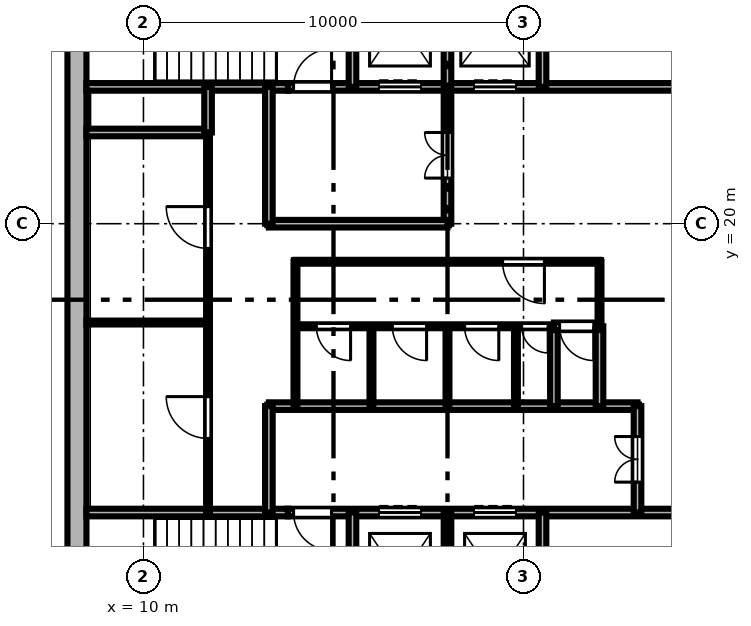
"""IFC4 building model, lengths in metres.
Left out: names, types, materials, properties, quantities, classifications, styles, units other than length and angle.
Written with IfcOpenShell. Run it as: python <this file> out.ifc"""

import sys

from ifc_helpers import new_model, si_unit, direction, frame, frame_2d, origin, place, context, subcontext, project, spatial, rectangle, extrude, element, fill, save


model = new_model("IFC4")
c1 = context("Model", 3, precision=1e-05, world=origin(), true_north=direction((0.0, 1.0)))
c2 = subcontext(c1, "Body", "Model", "MODEL_VIEW")
j1 = project(units=[si_unit("LENGTHUNIT", "METRE"), si_unit("PLANEANGLEUNIT", "RADIAN")], contexts=[c1])
p1 = place(None, origin())
s1 = spatial("IfcSite", under=j1, at=p1, CompositionType="ELEMENT")
p2 = place(p1, origin())
s2 = spatial("IfcBuilding", under=s1, at=p2, CompositionType="ELEMENT")
p3 = place(p2, frame((0.0, 0.0, 358.2)))
s3 = spatial("IfcBuildingStorey", under=s2, at=p3, CompositionType="ELEMENT", Elevation=358.2)
p4 = place(p3, frame((8.25, 27.5, 0.0), z_axis=(0.0, 0.0, 1.0), x_axis=(0.0, -1.0, 0.0)))
e1 = element("IfcWall", 1, at=p4, inside=s3, PredefinedType="SHEAR", context=c2, shape_type="SweptSolid", body=[
    extrude(rectangle(XDim=19.0, YDim=0.5, at=frame_2d((9.5, 0.0))), origin(), (0.0, 0.0, 1.0), 7.2),
])
p5 = place(p3, frame((8.5, 12.4, 0.0), z_axis=(0.0, 0.0, 1.0), x_axis=(1.0, 0.0, 0.0)))
e2 = element("IfcWall", 2, at=p5, inside=s3, PredefinedType="SHEAR", context=c2, shape_type="SweptSolid", body=[
    extrude(rectangle(XDim=5.3, YDim=0.2, at=frame_2d((2.65, 0.0))), origin(), (0.0, 0.0, 1.0), 6.75),
])
p6 = place(p3, frame((13.8, 12.4, 0.0), z_axis=(0.0, 0.0, 1.0), x_axis=(1.0, 0.0, 0.0)))
e3 = element("IfcWall", 3, at=p6, inside=s3, PredefinedType="SHEAR", context=c2, shape_type="SweptSolid", body=[
    extrude(rectangle(XDim=13.7, YDim=0.2, at=frame_2d((6.85, 0.0))), origin(), (0.0, 0.0, 1.0), 6.75),
])
p7 = place(p6, frame((2.4, 0.0, 0.0)))
e4 = element("IfcOpeningElement", 4, at=p7, cuts=e3, PredefinedType="OPENING", context=c2, shape_type="SweptSolid", body=[
    extrude(rectangle(XDim=1.1, YDim=2.1, at=frame_2d((0.55, 1.05))), frame((0.0, 0.11, 0.0), z_axis=(0.0, -1.0, 0.0), x_axis=(1.0, 0.0, 0.0)), (0.0, 0.0, 1.0), 0.22),
])
p8 = place(p6, frame((4.9, 0.0, 0.0)))
e5 = element("IfcOpeningElement", 5, at=p8, cuts=e3, PredefinedType="OPENING", context=c2, shape_type="SweptSolid", body=[
    extrude(rectangle(XDim=1.1, YDim=2.1, at=frame_2d((0.55, 1.05))), frame((0.0, 0.11, 0.0), z_axis=(0.0, -1.0, 0.0), x_axis=(1.0, 0.0, 0.0)), (0.0, 0.0, 1.0), 0.22),
])
p9 = place(p6, frame((0.15, 0.0, 0.0)))
e6 = element("IfcOpeningElement", 6, at=p9, cuts=e3, PredefinedType="OPENING", context=c2, shape_type="SweptSolid", body=[
    extrude(rectangle(XDim=1.0, YDim=2.1, at=frame_2d((0.5, 1.05))), frame((0.0, 0.11, 0.0), z_axis=(0.0, -1.0, 0.0), x_axis=(1.0, 0.0, 0.0)), (0.0, 0.0, 1.0), 0.22),
])
p10 = place(p3, frame((13.3, 15.2, 0.0), z_axis=(0.0, 0.0, 1.0), x_axis=(1.0, 0.0, 0.0)))
e7 = element("IfcWall", 7, at=p10, inside=s3, PredefinedType="SHEAR", context=c2, shape_type="SweptSolid", body=[
    extrude(rectangle(XDim=9.7, YDim=0.2, at=frame_2d((4.85, 0.0))), origin(), (0.0, 0.0, 1.0), 6.75),
])
p11 = place(p3, frame((14.0, 17.3, 0.0), z_axis=(0.0, 0.0, 1.0), x_axis=(1.0, 0.0, 0.0)))
e8 = element("IfcWall", 8, at=p11, inside=s3, PredefinedType="PARTITIONING", context=c2, shape_type="SweptSolid", body=[
    extrude(rectangle(XDim=6.8, YDim=0.1, at=frame_2d((3.4, 0.0))), origin(), (0.0, 0.0, 1.0), 6.75),
])
p12 = place(p11, frame((0.55, 0.0, 0.0)))
e9 = element("IfcOpeningElement", 9, at=p12, cuts=e8, PredefinedType="OPENING", context=c2, shape_type="SweptSolid", body=[
    extrude(rectangle(XDim=0.9, YDim=2.1, at=frame_2d((0.45, 1.05))), frame((0.0, 0.06, 0.0), z_axis=(0.0, -1.0, 0.0), x_axis=(1.0, 0.0, 0.0)), (0.0, 0.0, 1.0), 0.12),
])
p13 = place(p11, frame((2.55, 0.0, 0.0)))
e10 = element("IfcOpeningElement", 10, at=p13, cuts=e8, PredefinedType="OPENING", context=c2, shape_type="SweptSolid", body=[
    extrude(rectangle(XDim=0.9, YDim=2.1, at=frame_2d((0.45, 1.05))), frame((0.0, 0.06, 0.0), z_axis=(0.0, -1.0, 0.0), x_axis=(1.0, 0.0, 0.0)), (0.0, 0.0, 1.0), 0.12),
])
p14 = place(p11, frame((4.45, 0.0, 0.0)))
e11 = element("IfcOpeningElement", 11, at=p14, cuts=e8, PredefinedType="OPENING", context=c2, shape_type="SweptSolid", body=[
    extrude(rectangle(XDim=0.9, YDim=2.1, at=frame_2d((0.45, 1.05))), frame((0.0, 0.06, 0.0), z_axis=(0.0, -1.0, 0.0), x_axis=(1.0, 0.0, 0.0)), (0.0, 0.0, 1.0), 0.12),
])
p15 = place(p11, frame((5.95, 0.0, 0.0)))
e12 = element("IfcOpeningElement", 12, at=p15, cuts=e8, PredefinedType="OPENING", context=c2, shape_type="SweptSolid", body=[
    extrude(rectangle(XDim=0.7, YDim=2.1, at=frame_2d((0.35, 1.05))), frame((0.0, 0.06, 0.0), z_axis=(0.0, -1.0, 0.0), x_axis=(1.0, 0.0, 0.0)), (0.0, 0.0, 1.0), 0.12),
])
p16 = place(p3, frame((20.8, 17.3, 0.0), z_axis=(0.0, 0.0, 1.0), x_axis=(1.0, 0.0, 0.0)))
e13 = element("IfcWall", 13, at=p16, inside=s3, PredefinedType="SHEAR", context=c2, shape_type="SweptSolid", body=[
    extrude(rectangle(XDim=1.2, YDim=0.2, at=frame_2d((0.6, 0.0))), origin(), (0.0, 0.0, 1.0), 6.75),
])
p17 = place(p16, frame((0.15, 0.0, 0.0)))
e14 = element("IfcOpeningElement", 14, at=p17, cuts=e13, PredefinedType="OPENING", context=c2, shape_type="SweptSolid", body=[
    extrude(rectangle(XDim=0.9, YDim=2.1, at=frame_2d((0.45, 1.05))), frame((0.0, 0.11, 0.0), z_axis=(0.0, -1.0, 0.0), x_axis=(1.0, 0.0, 0.0)), (0.0, 0.0, 1.0), 0.22),
])
p18 = place(p3, frame((8.5, 17.4, 0.0), z_axis=(0.0, 0.0, 1.0), x_axis=(1.0, 0.0, 0.0)))
e15 = element("IfcWall", 15, at=p18, inside=s3, PredefinedType="PARTITIONING", context=c2, shape_type="SweptSolid", body=[
    extrude(rectangle(XDim=3.2, YDim=0.1, at=frame_2d((1.6, 0.0))), origin(), (0.0, 0.0, 1.0), 6.75),
])
p19 = place(p3, frame((14.0, 19.0, 0.0), z_axis=(0.0, 0.0, 1.0), x_axis=(1.0, 0.0, 0.0)))
e16 = element("IfcWall", 16, at=p19, inside=s3, PredefinedType="PARTITIONING", context=c2, shape_type="SweptSolid", body=[
    extrude(rectangle(XDim=8.0, YDim=0.1, at=frame_2d((4.0, 0.0))), origin(), (0.0, 0.0, 1.0), 6.75),
])
p20 = place(p19, frame((5.45, 0.0, 0.0)))
e17 = element("IfcOpeningElement", 17, at=p20, cuts=e16, PredefinedType="OPENING", context=c2, shape_type="SweptSolid", body=[
    extrude(rectangle(XDim=1.1, YDim=2.1, at=frame_2d((0.55, 1.05))), frame((0.0, 0.06, 0.0), z_axis=(0.0, -1.0, 0.0), x_axis=(1.0, 0.0, 0.0)), (0.0, 0.0, 1.0), 0.12),
])
p21 = place(p3, frame((13.3, 20.0, 0.0), z_axis=(0.0, 0.0, 1.0), x_axis=(1.0, 0.0, 0.0)))
e18 = element("IfcWall", 18, at=p21, inside=s3, PredefinedType="SHEAR", context=c2, shape_type="SweptSolid", body=[
    extrude(rectangle(XDim=4.7, YDim=0.2, at=frame_2d((2.35, 0.0))), origin(), (0.0, 0.0, 1.0), 6.75),
])
p22 = place(p3, frame((8.5, 22.4, 0.0), z_axis=(0.0, 0.0, 1.0), x_axis=(1.0, 0.0, 0.0)))
e19 = element("IfcWall", 19, at=p22, inside=s3, PredefinedType="SHEAR", context=c2, shape_type="SweptSolid", body=[
    extrude(rectangle(XDim=3.2, YDim=0.2, at=frame_2d((1.6, 0.0))), origin(), (0.0, 0.0, 1.0), 6.75),
])
p23 = place(p3, frame((8.5, 23.6, 0.0), z_axis=(0.0, 0.0, 1.0), x_axis=(1.0, 0.0, 0.0)))
e20 = element("IfcWall", 20, at=p23, inside=s3, PredefinedType="SHEAR", context=c2, shape_type="SweptSolid", body=[
    extrude(rectangle(XDim=5.3, YDim=0.2, at=frame_2d((2.65, 0.0))), origin(), (0.0, 0.0, 1.0), 6.75),
])
p24 = place(p3, frame((13.8, 23.6, 0.0), z_axis=(0.0, 0.0, 1.0), x_axis=(1.0, 0.0, 0.0)))
e21 = element("IfcWall", 21, at=p24, inside=s3, PredefinedType="SHEAR", context=c2, shape_type="SweptSolid", body=[
    extrude(rectangle(XDim=13.7, YDim=0.2, at=frame_2d((6.85, 0.0))), origin(), (0.0, 0.0, 1.0), 6.75),
])
p25 = place(p24, frame((2.4, 0.0, 0.0)))
e22 = element("IfcOpeningElement", 22, at=p25, cuts=e21, PredefinedType="OPENING", context=c2, shape_type="SweptSolid", body=[
    extrude(rectangle(XDim=1.1, YDim=2.1, at=frame_2d((0.55, 1.05))), frame((0.0, 0.11, 0.0), z_axis=(0.0, -1.0, 0.0), x_axis=(1.0, 0.0, 0.0)), (0.0, 0.0, 1.0), 0.22),
])
p26 = place(p24, frame((4.9, 0.0, 0.0)))
e23 = element("IfcOpeningElement", 23, at=p26, cuts=e21, PredefinedType="OPENING", context=c2, shape_type="SweptSolid", body=[
    extrude(rectangle(XDim=1.1, YDim=2.1, at=frame_2d((0.55, 1.05))), frame((0.0, 0.11, 0.0), z_axis=(0.0, -1.0, 0.0), x_axis=(1.0, 0.0, 0.0)), (0.0, 0.0, 1.0), 0.22),
])
p27 = place(p24, frame((0.15, 0.0, 0.0)))
e24 = element("IfcOpeningElement", 24, at=p27, cuts=e21, PredefinedType="OPENING", context=c2, shape_type="SweptSolid", body=[
    extrude(rectangle(XDim=1.0, YDim=2.1, at=frame_2d((0.5, 1.05))), frame((0.0, 0.11, 0.0), z_axis=(0.0, -1.0, 0.0), x_axis=(1.0, 0.0, 0.0)), (0.0, 0.0, 1.0), 0.22),
])
p28 = place(p3, frame((11.7, 12.4, 0.0), z_axis=(0.0, 0.0, 1.0), x_axis=(0.0, 1.0, 0.0)))
e25 = element("IfcWall", 25, at=p28, inside=s3, PredefinedType="PARTITIONING", context=c2, shape_type="SweptSolid", body=[
    extrude(rectangle(XDim=10.0, YDim=0.1, at=frame_2d((5.0, 0.0))), origin(), (0.0, 0.0, 1.0), 6.75),
])
p29 = place(p28, frame((1.95, 0.0, 0.0)))
e26 = element("IfcOpeningElement", 26, at=p29, cuts=e25, PredefinedType="OPENING", context=c2, shape_type="SweptSolid", body=[
    extrude(rectangle(XDim=1.1, YDim=2.1, at=frame_2d((0.55, 1.05))), frame((0.0, 0.06, 0.0), z_axis=(0.0, -1.0, 0.0), x_axis=(1.0, 0.0, 0.0)), (0.0, 0.0, 1.0), 0.12),
])
p30 = place(p28, frame((6.95, 0.0, 0.0)))
e27 = element("IfcOpeningElement", 27, at=p30, cuts=e25, PredefinedType="OPENING", context=c2, shape_type="SweptSolid", body=[
    extrude(rectangle(XDim=1.1, YDim=2.1, at=frame_2d((0.55, 1.05))), frame((0.0, 0.06, 0.0), z_axis=(0.0, -1.0, 0.0), x_axis=(1.0, 0.0, 0.0)), (0.0, 0.0, 1.0), 0.12),
])
p31 = place(p3, frame((11.7, 22.4, 0.0), z_axis=(0.0, 0.0, 1.0), x_axis=(0.0, 1.0, 0.0)))
e28 = element("IfcWall", 28, at=p31, inside=s3, PredefinedType="SHEAR", context=c2, shape_type="SweptSolid", body=[
    extrude(rectangle(XDim=1.2, YDim=0.2, at=frame_2d((0.6, 0.0))), origin(), (0.0, 0.0, 1.0), 6.75),
])
p32 = place(p3, frame((13.3, 12.4, 0.0), z_axis=(0.0, 0.0, 1.0), x_axis=(0.0, 1.0, 0.0)))
e29 = element("IfcWall", 29, at=p32, inside=s3, PredefinedType="SHEAR", context=c2, shape_type="SweptSolid", body=[
    extrude(rectangle(XDim=2.8, YDim=0.2, at=frame_2d((1.4, 0.0))), origin(), (0.0, 0.0, 1.0), 6.75),
])
p33 = place(p3, frame((13.3, 20.0, 0.0), z_axis=(0.0, 0.0, 1.0), x_axis=(0.0, 1.0, 0.0)))
e30 = element("IfcWall", 30, at=p33, inside=s3, PredefinedType="SHEAR", context=c2, shape_type="SweptSolid", body=[
    extrude(rectangle(XDim=3.6, YDim=0.2, at=frame_2d((1.8, 0.0))), origin(), (0.0, 0.0, 1.0), 6.75),
])
p34 = place(p3, frame((14.0, 15.2, 0.0), z_axis=(0.0, 0.0, 1.0), x_axis=(0.0, 1.0, 0.0)))
e31 = element("IfcWall", 31, at=p34, inside=s3, PredefinedType="PARTITIONING", context=c2, shape_type="SweptSolid", body=[
    extrude(rectangle(XDim=3.8, YDim=0.1, at=frame_2d((1.9, 0.0))), origin(), (0.0, 0.0, 1.0), 6.75),
])
for number, where, z_axis, x_axis in (
    (32, (15.5, 8.5, 0.0), (0.0, 0.0, 1.0), (0.0, 1.0, 0.0)),
    (33, (15.5, 23.6, 0.0), (0.0, 0.0, 1.0), (0.0, 1.0, 0.0)),
):
    element("IfcWall", number, at=place(p3, frame(where, z_axis=z_axis, x_axis=x_axis)), inside=s3, PredefinedType="SHEAR", context=c2, shape_type="SweptSolid", body=[
        extrude(rectangle(XDim=3.9, YDim=0.2, at=frame_2d((1.95, 0.0))), origin(), (0.0, 0.0, 1.0), 6.75),
    ])
for number, where, z_axis, x_axis in (
    (34, (16.0, 15.2, 0.0), (0.0, 0.0, 1.0), (0.0, 1.0, 0.0)),
    (35, (18.0, 15.2, 0.0), (0.0, 0.0, 1.0), (0.0, 1.0, 0.0)),
):
    element("IfcWall", number, at=place(p3, frame(where, z_axis=z_axis, x_axis=x_axis)), inside=s3, PredefinedType="PARTITIONING", context=c2, shape_type="SweptSolid", body=[
        extrude(rectangle(XDim=2.1, YDim=0.1, at=frame_2d((1.05, 0.0))), origin(), (0.0, 0.0, 1.0), 6.75),
    ])
p35 = place(p3, frame((18.0, 8.5, 0.0), z_axis=(0.0, 0.0, 1.0), x_axis=(0.0, 1.0, 0.0)))
e36 = element("IfcWall", 36, at=p35, inside=s3, PredefinedType="SHEAR", context=c2, shape_type="SweptSolid", body=[
    extrude(rectangle(XDim=3.9, YDim=0.2, at=frame_2d((1.95, 0.0))), origin(), (0.0, 0.0, 1.0), 6.75),
])
p36 = place(p3, frame((18.0, 20.0, 0.0), z_axis=(0.0, 0.0, 1.0), x_axis=(0.0, 1.0, 0.0)))
e37 = element("IfcWall", 37, at=p36, inside=s3, PredefinedType="SHEAR", context=c2, shape_type="SweptSolid", body=[
    extrude(rectangle(XDim=7.5, YDim=0.2, at=frame_2d((3.75, 0.0))), origin(), (0.0, 0.0, 1.0), 6.75),
])
p37 = place(p36, frame((1.2, 0.0, 0.0)))
e38 = element("IfcOpeningElement", 38, at=p37, cuts=e37, PredefinedType="OPENING", context=c2, shape_type="SweptSolid", body=[
    extrude(rectangle(XDim=1.2, YDim=2.1, at=frame_2d((0.6, 1.05))), frame((0.0, 0.11, 0.0), z_axis=(0.0, -1.0, 0.0), x_axis=(1.0, 0.0, 0.0)), (0.0, 0.0, 1.0), 0.22),
])
p38 = place(p3, frame((19.8, 15.2, 0.0), z_axis=(0.0, 0.0, 1.0), x_axis=(0.0, 1.0, 0.0)))
e39 = element("IfcWall", 39, at=p38, inside=s3, PredefinedType="PARTITIONING", context=c2, shape_type="SweptSolid", body=[
    extrude(rectangle(XDim=2.1, YDim=0.1, at=frame_2d((1.05, 0.0))), origin(), (0.0, 0.0, 1.0), 6.75),
])
for number, where, z_axis, x_axis in (
    (40, (20.5, 8.5, 0.0), (0.0, 0.0, 1.0), (0.0, 1.0, 0.0)),
    (41, (20.5, 23.6, 0.0), (0.0, 0.0, 1.0), (0.0, 1.0, 0.0)),
):
    element("IfcWall", number, at=place(p3, frame(where, z_axis=z_axis, x_axis=x_axis)), inside=s3, PredefinedType="SHEAR", context=c2, shape_type="SweptSolid", body=[
        extrude(rectangle(XDim=3.9, YDim=0.2, at=frame_2d((1.95, 0.0))), origin(), (0.0, 0.0, 1.0), 6.75),
    ])
p39 = place(p3, frame((20.8, 15.2, 0.0), z_axis=(0.0, 0.0, 1.0), x_axis=(0.0, 1.0, 0.0)))
e42 = element("IfcWall", 42, at=p39, inside=s3, PredefinedType="SHEAR", context=c2, shape_type="SweptSolid", body=[
    extrude(rectangle(XDim=2.1, YDim=0.2, at=frame_2d((1.05, 0.0))), origin(), (0.0, 0.0, 1.0), 6.75),
])
p40 = place(p3, frame((22.0, 17.3, 0.0), z_axis=(0.0, 0.0, 1.0), x_axis=(0.0, 1.0, 0.0)))
e43 = element("IfcWall", 43, at=p40, inside=s3, PredefinedType="PARTITIONING", context=c2, shape_type="SweptSolid", body=[
    extrude(rectangle(XDim=1.7, YDim=0.1, at=frame_2d((0.85, 0.0))), origin(), (0.0, 0.0, 1.0), 6.75),
])
p41 = place(p3, frame((22.0, 15.2, 0.0), z_axis=(0.0, 0.0, 1.0), x_axis=(0.0, 1.0, 0.0)))
e44 = element("IfcWall", 44, at=p41, inside=s3, PredefinedType="SHEAR", context=c2, shape_type="SweptSolid", body=[
    extrude(rectangle(XDim=2.1, YDim=0.2, at=frame_2d((1.05, 0.0))), origin(), (0.0, 0.0, 1.0), 6.75),
])
p42 = place(p3, frame((23.0, 12.4, 0.0), z_axis=(0.0, 0.0, 1.0), x_axis=(0.0, 1.0, 0.0)))
e45 = element("IfcWall", 45, at=p42, inside=s3, PredefinedType="SHEAR", context=c2, shape_type="SweptSolid", body=[
    extrude(rectangle(XDim=2.8, YDim=0.2, at=frame_2d((1.4, 0.0))), origin(), (0.0, 0.0, 1.0), 6.75),
])
p43 = place(p42, frame((0.8, 0.0, 0.0)))
e46 = element("IfcOpeningElement", 46, at=p43, cuts=e45, PredefinedType="OPENING", context=c2, shape_type="SweptSolid", body=[
    extrude(rectangle(XDim=1.2, YDim=2.1, at=frame_2d((0.6, 1.05))), frame((0.0, 0.11, 0.0), z_axis=(0.0, -1.0, 0.0), x_axis=(1.0, 0.0, 0.0)), (0.0, 0.0, 1.0), 0.22),
])
p44 = place(p7, origin())
e47 = element("IfcDoor", 47, at=p44, inside=s3, OperationType="DOUBLE_DOOR_SLIDING", PredefinedType="DOOR", context=c2, shape_type="SweptSolid", body=[
    extrude(rectangle(XDim=1.1, YDim=2.1, at=frame_2d((0.55, 1.05))), frame((0.0, 0.025, 0.0), z_axis=(0.0, -1.0, 0.0), x_axis=(1.0, 0.0, 0.0)), (0.0, 0.0, 1.0), 0.05),
])
fill(e4, e47)
p45 = place(p8, origin())
e48 = element("IfcDoor", 48, at=p45, inside=s3, OperationType="DOUBLE_DOOR_SLIDING", PredefinedType="DOOR", context=c2, shape_type="SweptSolid", body=[
    extrude(rectangle(XDim=1.1, YDim=2.1, at=frame_2d((0.55, 1.05))), frame((0.0, 0.025, 0.0), z_axis=(0.0, -1.0, 0.0), x_axis=(1.0, 0.0, 0.0)), (0.0, 0.0, 1.0), 0.05),
])
fill(e5, e48)
p46 = place(p25, origin())
e49 = element("IfcDoor", 49, at=p46, inside=s3, OperationType="DOUBLE_DOOR_SLIDING", PredefinedType="DOOR", context=c2, shape_type="SweptSolid", body=[
    extrude(rectangle(XDim=1.1, YDim=2.1, at=frame_2d((0.55, 1.05))), frame((0.0, 0.025, 0.0), z_axis=(0.0, -1.0, 0.0), x_axis=(1.0, 0.0, 0.0)), (0.0, 0.0, 1.0), 0.05),
])
fill(e22, e49)
p47 = place(p26, origin())
e50 = element("IfcDoor", 50, at=p47, inside=s3, OperationType="DOUBLE_DOOR_SLIDING", PredefinedType="DOOR", context=c2, shape_type="SweptSolid", body=[
    extrude(rectangle(XDim=1.1, YDim=2.1, at=frame_2d((0.55, 1.05))), frame((0.0, 0.025, 0.0), z_axis=(0.0, -1.0, 0.0), x_axis=(1.0, 0.0, 0.0)), (0.0, 0.0, 1.0), 0.05),
])
fill(e23, e50)
p48 = place(p9, frame((1.0, 0.0, 0.0), z_axis=(0.0, 0.0, 1.0), x_axis=(-1.0, 0.0, 0.0)))
e51 = element("IfcDoor", 51, at=p48, inside=s3, OperationType="SINGLE_SWING_LEFT", PredefinedType="DOOR", context=c2, shape_type="SweptSolid", body=[
    extrude(rectangle(XDim=1.0, YDim=2.1, at=frame_2d((0.5, 1.05))), frame((0.0, 0.025, 0.0), z_axis=(0.0, -1.0, 0.0), x_axis=(1.0, 0.0, 0.0)), (0.0, 0.0, 1.0), 0.05),
])
fill(e6, e51)
p49 = place(p27, origin())
e52 = element("IfcDoor", 52, at=p49, inside=s3, OperationType="SINGLE_SWING_RIGHT", PredefinedType="DOOR", context=c2, shape_type="SweptSolid", body=[
    extrude(rectangle(XDim=1.0, YDim=2.1, at=frame_2d((0.5, 1.05))), frame((0.0, 0.025, 0.0), z_axis=(0.0, -1.0, 0.0), x_axis=(1.0, 0.0, 0.0)), (0.0, 0.0, 1.0), 0.05),
])
fill(e24, e52)
p50 = place(p43, origin())
e53 = element("IfcDoor", 53, at=p50, inside=s3, OperationType="DOUBLE_DOOR_SINGLE_SWING", PredefinedType="DOOR", context=c2, shape_type="SweptSolid", body=[
    extrude(rectangle(XDim=1.2, YDim=2.1, at=frame_2d((0.6, 1.05))), frame((0.0, 0.025, 0.0), z_axis=(0.0, -1.0, 0.0), x_axis=(1.0, 0.0, 0.0)), (0.0, 0.0, 1.0), 0.05),
])
fill(e46, e53)
p51 = place(p37, origin())
e54 = element("IfcDoor", 54, at=p51, inside=s3, OperationType="DOUBLE_DOOR_SINGLE_SWING", PredefinedType="DOOR", context=c2, shape_type="SweptSolid", body=[
    extrude(rectangle(XDim=1.2, YDim=2.1, at=frame_2d((0.6, 1.05))), frame((0.0, 0.025, 0.0), z_axis=(0.0, -1.0, 0.0), x_axis=(1.0, 0.0, 0.0)), (0.0, 0.0, 1.0), 0.05),
])
fill(e38, e54)
p52 = place(p20, frame((1.1, 0.0, 0.0), z_axis=(0.0, 0.0, 1.0), x_axis=(-1.0, 0.0, 0.0)))
e55 = element("IfcDoor", 55, at=p52, inside=s3, OperationType="SINGLE_SWING_LEFT", PredefinedType="DOOR", context=c2, shape_type="SweptSolid", body=[
    extrude(rectangle(XDim=1.1, YDim=2.1, at=frame_2d((0.55, 1.05))), frame((0.0, 0.025, 0.0), z_axis=(0.0, -1.0, 0.0), x_axis=(1.0, 0.0, 0.0)), (0.0, 0.0, 1.0), 0.05),
])
fill(e17, e55)
p53 = place(p12, frame((0.9, 0.0, 0.0), z_axis=(0.0, 0.0, 1.0), x_axis=(-1.0, 0.0, 0.0)))
e56 = element("IfcDoor", 56, at=p53, inside=s3, OperationType="SINGLE_SWING_LEFT", PredefinedType="DOOR", context=c2, shape_type="SweptSolid", body=[
    extrude(rectangle(XDim=0.9, YDim=2.1, at=frame_2d((0.45, 1.05))), frame((0.0, 0.025, 0.0), z_axis=(0.0, -1.0, 0.0), x_axis=(1.0, 0.0, 0.0)), (0.0, 0.0, 1.0), 0.05),
])
fill(e9, e56)
p54 = place(p13, frame((0.9, 0.0, 0.0), z_axis=(0.0, 0.0, 1.0), x_axis=(-1.0, 0.0, 0.0)))
e57 = element("IfcDoor", 57, at=p54, inside=s3, OperationType="SINGLE_SWING_LEFT", PredefinedType="DOOR", context=c2, shape_type="SweptSolid", body=[
    extrude(rectangle(XDim=0.9, YDim=2.1, at=frame_2d((0.45, 1.05))), frame((0.0, 0.025, 0.0), z_axis=(0.0, -1.0, 0.0), x_axis=(1.0, 0.0, 0.0)), (0.0, 0.0, 1.0), 0.05),
])
fill(e10, e57)
p55 = place(p14, frame((0.9, 0.0, 0.0), z_axis=(0.0, 0.0, 1.0), x_axis=(-1.0, 0.0, 0.0)))
e58 = element("IfcDoor", 58, at=p55, inside=s3, OperationType="SINGLE_SWING_LEFT", PredefinedType="DOOR", context=c2, shape_type="SweptSolid", body=[
    extrude(rectangle(XDim=0.9, YDim=2.1, at=frame_2d((0.45, 1.05))), frame((0.0, 0.025, 0.0), z_axis=(0.0, -1.0, 0.0), x_axis=(1.0, 0.0, 0.0)), (0.0, 0.0, 1.0), 0.05),
])
fill(e11, e58)
p56 = place(p15, frame((0.7, 0.0, 0.0), z_axis=(0.0, 0.0, 1.0), x_axis=(-1.0, 0.0, 0.0)))
e59 = element("IfcDoor", 59, at=p56, inside=s3, OperationType="SINGLE_SWING_LEFT", PredefinedType="DOOR", context=c2, shape_type="SweptSolid", body=[
    extrude(rectangle(XDim=0.7, YDim=2.1, at=frame_2d((0.35, 1.05))), frame((0.0, 0.025, 0.0), z_axis=(0.0, -1.0, 0.0), x_axis=(1.0, 0.0, 0.0)), (0.0, 0.0, 1.0), 0.05),
])
fill(e12, e59)
p57 = place(p17, frame((0.9, 0.0, 0.0), z_axis=(0.0, 0.0, 1.0), x_axis=(-1.0, 0.0, 0.0)))
e60 = element("IfcDoor", 60, at=p57, inside=s3, OperationType="SINGLE_SWING_LEFT", PredefinedType="DOOR", context=c2, shape_type="SweptSolid", body=[
    extrude(rectangle(XDim=0.9, YDim=2.1, at=frame_2d((0.45, 1.05))), frame((0.0, 0.025, 0.0), z_axis=(0.0, -1.0, 0.0), x_axis=(1.0, 0.0, 0.0)), (0.0, 0.0, 1.0), 0.05),
])
fill(e14, e60)
p58 = place(p29, origin())
e61 = element("IfcDoor", 61, at=p58, inside=s3, OperationType="SINGLE_SWING_RIGHT", PredefinedType="DOOR", context=c2, shape_type="SweptSolid", body=[
    extrude(rectangle(XDim=1.1, YDim=2.1, at=frame_2d((0.55, 1.05))), frame((0.0, 0.025, 0.0), z_axis=(0.0, -1.0, 0.0), x_axis=(1.0, 0.0, 0.0)), (0.0, 0.0, 1.0), 0.05),
])
fill(e26, e61)
p59 = place(p30, origin())
e62 = element("IfcDoor", 62, at=p59, inside=s3, OperationType="SINGLE_SWING_RIGHT", PredefinedType="DOOR", context=c2, shape_type="SweptSolid", body=[
    extrude(rectangle(XDim=1.1, YDim=2.1, at=frame_2d((0.55, 1.05))), frame((0.0, 0.025, 0.0), z_axis=(0.0, -1.0, 0.0), x_axis=(1.0, 0.0, 0.0)), (0.0, 0.0, 1.0), 0.05),
])
fill(e27, e62)
save(model, sys.argv[1])
